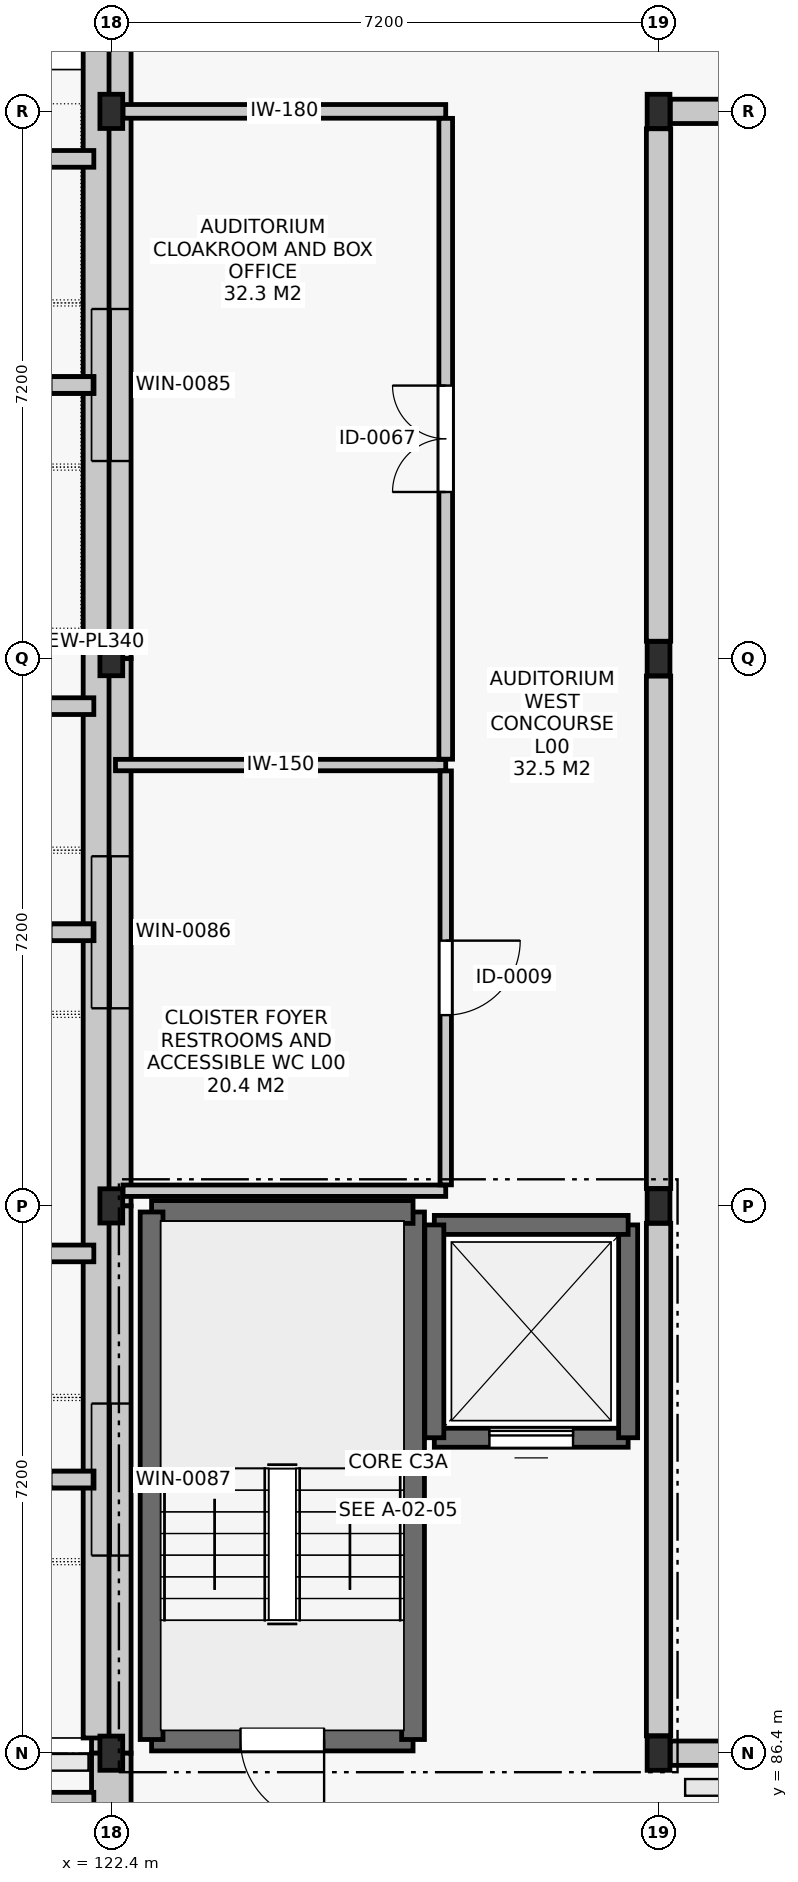
"""IFC4 building model, lengths in metres.
Left out: names, types, materials, properties, quantities, classifications, styles, units other than length and angle.
Written with IfcOpenShell. Run it as: python <this file> out.ifc"""

import sys

from ifc_helpers import new_model, si_unit, direction, frame, frame_2d, origin, origin_2d, place, context, subcontext, project, spatial, rectangle, i_section, extrude, element, fill, save


model = new_model("IFC4")
c1 = context("Model", 3, precision=1e-05, world=origin(), true_north=direction((0.0, 1.0)))
c2 = subcontext(c1, "Body", "Model", "MODEL_VIEW")
j1 = project(units=[si_unit("LENGTHUNIT", "METRE"), si_unit("PLANEANGLEUNIT", "RADIAN")], contexts=[c1])
p1 = place(None, origin())
s1 = spatial("IfcSite", under=j1, at=p1, CompositionType="ELEMENT")
p2 = place(p1, origin())
s2 = spatial("IfcBuilding", under=s1, at=p2, CompositionType="ELEMENT")
p3 = place(p2, origin())
s3 = spatial("IfcBuildingStorey", under=s2, at=p3, CompositionType="ELEMENT", Elevation=0.0)
for number, where, z_axis, x_axis in (
    (1, (122.4, 86.4, 0.0), (0.0, 0.0, 1.0), (1.0, 0.0, 0.0)),
    (2, (122.4, 93.6, 0.0), (0.0, 0.0, 1.0), (1.0, 0.0, 0.0)),
    (3, (122.4, 100.8, 0.0), (0.0, 0.0, 1.0), (1.0, 0.0, 0.0)),
    (4, (122.4, 108.0, 0.0), (0.0, 0.0, 1.0), (1.0, 0.0, 0.0)),
    (5, (129.6, 86.4, 0.0), (0.0, 0.0, 1.0), (1.0, 0.0, 0.0)),
    (6, (129.6, 93.6, 0.0), (0.0, 0.0, 1.0), (1.0, 0.0, 0.0)),
    (7, (129.6, 100.8, 0.0), (0.0, 0.0, 1.0), (1.0, 0.0, 0.0)),
    (8, (129.6, 108.0, 0.0), (0.0, 0.0, 1.0), (1.0, 0.0, 0.0)),
):
    element("IfcColumn", number, at=place(p3, frame(where, z_axis=z_axis, x_axis=x_axis)), inside=s3, PredefinedType="COLUMN", context=c2, shape_type="SweptSolid", body=[
        extrude(i_section(OverallWidth=0.3, OverallDepth=0.45, WebThickness=0.014, FlangeThickness=0.026, FilletRadius=0.027, at=origin_2d()), origin(), (0.0, 0.0, 1.0), 5.4),
    ])
p4 = place(p3, frame((122.4, 114.971, 0.0), z_axis=(0.0, 0.0, 1.0), x_axis=(0.0, -1.0, 0.0)))
e9 = element("IfcWall", 9, at=p4, inside=s3, PredefinedType="SOLIDWALL", context=c2, shape_type="SweptSolid", body=[
    extrude(rectangle(XDim=6.971, YDim=0.52, at=frame_2d((3.485, 0.0))), origin(), (0.0, 0.0, 1.0), 4.4),
])
p5 = place(p4, frame((2.371, 0.0, 1.35)))
e10 = element("IfcOpeningElement", 10, at=p5, cuts=e9, PredefinedType="OPENING", context=c2, shape_type="SweptSolid", body=[
    extrude(rectangle(XDim=2.0, YDim=1.5, at=frame_2d((1.0, 0.75))), frame((0.0, 0.272, 0.0), z_axis=(0.0, -1.0, 0.0), x_axis=(1.0, 0.0, 0.0)), (0.0, 0.0, 1.0), 0.544),
])
p6 = place(p3, frame((122.4, 108.0, 0.0), z_axis=(0.0, 0.0, 1.0), x_axis=(0.0, -1.0, 0.0)))
e11 = element("IfcWall", 11, at=p6, inside=s3, PredefinedType="SOLIDWALL", context=c2, shape_type="SweptSolid", body=[
    extrude(rectangle(XDim=7.2, YDim=0.52, at=frame_2d((3.6, 0.0))), origin(), (0.0, 0.0, 1.0), 4.4),
])
p7 = place(p6, frame((2.6, 0.0, 1.35)))
e12 = element("IfcOpeningElement", 12, at=p7, cuts=e11, PredefinedType="OPENING", context=c2, shape_type="SweptSolid", body=[
    extrude(rectangle(XDim=2.0, YDim=1.5, at=frame_2d((1.0, 0.75))), frame((0.0, 0.272, 0.0), z_axis=(0.0, -1.0, 0.0), x_axis=(1.0, 0.0, 0.0)), (0.0, 0.0, 1.0), 0.544),
])
p8 = place(p3, frame((122.4, 100.8, 0.0), z_axis=(0.0, 0.0, 1.0), x_axis=(0.0, -1.0, 0.0)))
e13 = element("IfcWall", 13, at=p8, inside=s3, PredefinedType="SOLIDWALL", context=c2, shape_type="SweptSolid", body=[
    extrude(rectangle(XDim=7.2, YDim=0.52, at=frame_2d((3.6, 0.0))), origin(), (0.0, 0.0, 1.0), 4.4),
])
p9 = place(p8, frame((2.6, 0.0, 1.35)))
e14 = element("IfcOpeningElement", 14, at=p9, cuts=e13, PredefinedType="OPENING", context=c2, shape_type="SweptSolid", body=[
    extrude(rectangle(XDim=2.0, YDim=1.5, at=frame_2d((1.0, 0.75))), frame((0.0, 0.272, 0.0), z_axis=(0.0, -1.0, 0.0), x_axis=(1.0, 0.0, 0.0)), (0.0, 0.0, 1.0), 0.544),
])
p10 = place(p3, frame((122.4, 93.6, 0.0), z_axis=(0.0, 0.0, 1.0), x_axis=(0.0, -1.0, 0.0)))
e15 = element("IfcWall", 15, at=p10, inside=s3, PredefinedType="SOLIDWALL", context=c2, shape_type="SweptSolid", body=[
    extrude(rectangle(XDim=7.2, YDim=0.52, at=frame_2d((3.6, 0.0))), origin(), (0.0, 0.0, 1.0), 4.4),
])
p11 = place(p10, frame((2.6, 0.0, 1.35)))
e16 = element("IfcOpeningElement", 16, at=p11, cuts=e15, PredefinedType="OPENING", context=c2, shape_type="SweptSolid", body=[
    extrude(rectangle(XDim=2.0, YDim=1.5, at=frame_2d((1.0, 0.75))), frame((0.0, 0.272, 0.0), z_axis=(0.0, -1.0, 0.0), x_axis=(1.0, 0.0, 0.0)), (0.0, 0.0, 1.0), 0.544),
])
p12 = place(p3, frame((122.4, 86.4, 0.0), z_axis=(0.0, 0.0, 1.0), x_axis=(0.0, -1.0, 0.0)))
e17 = element("IfcWall", 17, at=p12, inside=s3, PredefinedType="SOLIDWALL", context=c2, shape_type="SweptSolid", body=[
    extrude(rectangle(XDim=6.971, YDim=0.52, at=frame_2d((3.485, 0.0))), origin(), (0.0, 0.0, 1.0), 4.4),
])
p13 = place(p12, frame((2.7, 0.0, 0.0)))
e18 = element("IfcOpeningElement", 18, at=p13, cuts=e17, PredefinedType="OPENING", context=c2, shape_type="SweptSolid", body=[
    extrude(rectangle(XDim=1.8, YDim=2.3, at=frame_2d((0.9, 1.15))), frame((0.0, 0.272, 0.0), z_axis=(0.0, -1.0, 0.0), x_axis=(1.0, 0.0, 0.0)), (0.0, 0.0, 1.0), 0.544),
])
p14 = place(p3, frame((122.2, 86.6, -0.905), z_axis=(0.0, 0.0, 1.0), x_axis=(0.0, 1.0, 0.0)))
e19 = element("IfcWall", 19, at=p14, inside=s3, PredefinedType="SOLIDWALL", context=c2, shape_type="SweptSolid", body=[
    extrude(rectangle(XDim=28.85, YDim=0.34, at=frame_2d((14.425, 0.0))), origin(), (0.0, 0.0, 1.0), 0.905),
])
p15 = place(p3, frame((122.93, 86.58, 0.0), z_axis=(0.0, 0.0, 1.0), x_axis=(1.0, 0.0, 0.0)))
e20 = element("IfcWall", 20, at=p15, inside=s3, PredefinedType="SHEAR", context=c2, shape_type="SweptSolid", body=[
    extrude(rectangle(XDim=3.44, YDim=0.3, at=frame_2d((1.72, 0.0))), origin(), (0.0, 0.0, 1.0), 5.12),
])
p16 = place(p15, frame((1.17, 0.0, 0.0)))
e21 = element("IfcOpeningElement", 21, at=p16, cuts=e20, PredefinedType="OPENING", context=c2, shape_type="SweptSolid", body=[
    extrude(rectangle(XDim=1.1, YDim=2.15, at=frame_2d((0.55, 1.075))), frame((0.0, 0.162, 0.0), z_axis=(0.0, -1.0, 0.0), x_axis=(1.0, 0.0, 0.0)), (0.0, 0.0, 1.0), 0.324),
])
p17 = place(p3, frame((126.37, 86.58, 0.0), z_axis=(0.0, 0.0, 1.0), x_axis=(0.0, 1.0, 0.0)))
e22 = element("IfcWall", 22, at=p17, inside=s3, PredefinedType="SHEAR", context=c2, shape_type="SweptSolid", body=[
    extrude(rectangle(XDim=6.94, YDim=0.3, at=frame_2d((3.47, 0.0))), origin(), (0.0, 0.0, 1.0), 5.12),
])
p18 = place(p3, frame((126.37, 93.52, 0.0), z_axis=(0.0, 0.0, 1.0), x_axis=(-1.0, 0.0, 0.0)))
e23 = element("IfcWall", 23, at=p18, inside=s3, PredefinedType="SHEAR", context=c2, shape_type="SweptSolid", body=[
    extrude(rectangle(XDim=3.44, YDim=0.3, at=frame_2d((1.72, 0.0))), origin(), (0.0, 0.0, 1.0), 5.12),
])
p19 = place(p3, frame((122.93, 93.52, 0.0), z_axis=(0.0, 0.0, 1.0), x_axis=(0.0, -1.0, 0.0)))
e24 = element("IfcWall", 24, at=p19, inside=s3, PredefinedType="SHEAR", context=c2, shape_type="SweptSolid", body=[
    extrude(rectangle(XDim=6.94, YDim=0.3, at=frame_2d((3.47, 0.0))), origin(), (0.0, 0.0, 1.0), 5.12),
])
p20 = place(p3, frame((126.65, 90.55, 0.0), z_axis=(0.0, 0.0, 1.0), x_axis=(1.0, 0.0, 0.0)))
e25 = element("IfcWall", 25, at=p20, inside=s3, PredefinedType="SHEAR", context=c2, shape_type="SweptSolid", body=[
    extrude(rectangle(XDim=2.55, YDim=0.25, at=frame_2d((1.275, 0.0))), origin(), (0.0, 0.0, 1.0), 5.12),
])
p21 = place(p20, frame((0.725, 0.0, 0.0)))
e26 = element("IfcOpeningElement", 26, at=p21, cuts=e25, PredefinedType="OPENING", context=c2, shape_type="SweptSolid", body=[
    extrude(rectangle(XDim=1.1, YDim=2.1, at=frame_2d((0.55, 1.05))), frame((0.0, 0.137, 0.0), z_axis=(0.0, -1.0, 0.0), x_axis=(1.0, 0.0, 0.0)), (0.0, 0.0, 1.0), 0.274),
])
p22 = place(p3, frame((129.2, 90.55, 0.0), z_axis=(0.0, 0.0, 1.0), x_axis=(0.0, 1.0, 0.0)))
e27 = element("IfcWall", 27, at=p22, inside=s3, PredefinedType="SHEAR", context=c2, shape_type="SweptSolid", body=[
    extrude(rectangle(XDim=2.8, YDim=0.25, at=frame_2d((1.4, 0.0))), origin(), (0.0, 0.0, 1.0), 5.12),
])
p23 = place(p3, frame((129.2, 93.35, 0.0), z_axis=(0.0, 0.0, 1.0), x_axis=(-1.0, 0.0, 0.0)))
e28 = element("IfcWall", 28, at=p23, inside=s3, PredefinedType="SHEAR", context=c2, shape_type="SweptSolid", body=[
    extrude(rectangle(XDim=2.55, YDim=0.25, at=frame_2d((1.275, 0.0))), origin(), (0.0, 0.0, 1.0), 5.12),
])
p24 = place(p3, frame((126.65, 93.35, 0.0), z_axis=(0.0, 0.0, 1.0), x_axis=(0.0, -1.0, 0.0)))
e29 = element("IfcWall", 29, at=p24, inside=s3, PredefinedType="SHEAR", context=c2, shape_type="SweptSolid", body=[
    extrude(rectangle(XDim=2.8, YDim=0.25, at=frame_2d((1.4, 0.0))), origin(), (0.0, 0.0, 1.0), 5.12),
])
p25 = place(p3, frame((122.554, 93.8, 0.0), z_axis=(0.0, 0.0, 1.0), x_axis=(1.0, 0.0, 0.0)))
e30 = element("IfcWall", 30, at=p25, inside=s3, PredefinedType="PARTITIONING", context=c2, shape_type="SweptSolid", body=[
    extrude(rectangle(XDim=4.246, YDim=0.15, at=frame_2d((2.123, 0.0))), origin(), (0.0, 0.0, 1.0), 4.615),
])
p26 = place(p3, frame((122.455, 99.4, 0.0), z_axis=(0.0, 0.0, 1.0), x_axis=(1.0, 0.0, 0.0)))
e31 = element("IfcWall", 31, at=p26, inside=s3, PredefinedType="PARTITIONING", context=c2, shape_type="SweptSolid", body=[
    extrude(rectangle(XDim=4.345, YDim=0.15, at=frame_2d((2.172, 0.0))), origin(), (0.0, 0.0, 1.0), 4.555),
])
p27 = place(p3, frame((129.754, 86.4, 0.0), z_axis=(0.0, 0.0, 1.0), x_axis=(1.0, 0.0, 0.0)))
e32 = element("IfcWall", 32, at=p27, inside=s3, PredefinedType="SOLIDWALL", context=c2, shape_type="SweptSolid", body=[
    extrude(rectangle(XDim=6.892, YDim=0.32, at=frame_2d((3.446, 0.0))), origin(), (0.0, 0.0, 1.0), 5.105),
])
p28 = place(p27, frame((2.446, 0.0, 0.0)))
e33 = element("IfcOpeningElement", 33, at=p28, cuts=e32, PredefinedType="OPENING", context=c2, shape_type="SweptSolid", body=[
    extrude(rectangle(XDim=2.0, YDim=2.4, at=frame_2d((1.0, 1.2))), frame((0.0, 0.172, 0.0), z_axis=(0.0, -1.0, 0.0), x_axis=(1.0, 0.0, 0.0)), (0.0, 0.0, 1.0), 0.344),
])
p29 = place(p3, frame((129.754, 108.0, 0.0), z_axis=(0.0, 0.0, 1.0), x_axis=(1.0, 0.0, 0.0)))
e34 = element("IfcWall", 34, at=p29, inside=s3, PredefinedType="SOLIDWALL", context=c2, shape_type="SweptSolid", body=[
    extrude(rectangle(XDim=6.892, YDim=0.32, at=frame_2d((3.446, 0.0))), origin(), (0.0, 0.0, 1.0), 5.105),
])
p30 = place(p29, frame((2.446, 0.0, 0.0)))
e35 = element("IfcOpeningElement", 35, at=p30, cuts=e34, PredefinedType="OPENING", context=c2, shape_type="SweptSolid", body=[
    extrude(rectangle(XDim=2.0, YDim=2.4, at=frame_2d((1.0, 1.2))), frame((0.0, 0.172, 0.0), z_axis=(0.0, -1.0, 0.0), x_axis=(1.0, 0.0, 0.0)), (0.0, 0.0, 1.0), 0.344),
])
p31 = place(p3, frame((122.554, 108.0, 0.0), z_axis=(0.0, 0.0, 1.0), x_axis=(1.0, 0.0, 0.0)))
e36 = element("IfcWall", 36, at=p31, inside=s3, PredefinedType="PARTITIONING", context=c2, shape_type="SweptSolid", body=[
    extrude(rectangle(XDim=4.246, YDim=0.18, at=frame_2d((2.123, 0.0))), origin(), (0.0, 0.0, 1.0), 4.615),
])
p32 = place(p3, frame((126.8, 93.877, 0.0), z_axis=(0.0, 0.0, 1.0), x_axis=(0.0, 1.0, 0.0)))
e37 = element("IfcWall", 37, at=p32, inside=s3, PredefinedType="PARTITIONING", context=c2, shape_type="SweptSolid", body=[
    extrude(rectangle(XDim=5.446, YDim=0.15, at=frame_2d((2.723, 0.0))), origin(), (0.0, 0.0, 1.0), 5.105),
])
p33 = place(p32, frame((2.233, 0.0, 0.0)))
e38 = element("IfcOpeningElement", 38, at=p33, cuts=e37, PredefinedType="OPENING", context=c2, shape_type="SweptSolid", body=[
    extrude(rectangle(XDim=0.98, YDim=2.1, at=frame_2d((0.49, 1.05))), frame((0.0, 0.087, 0.0), z_axis=(0.0, -1.0, 0.0), x_axis=(1.0, 0.0, 0.0)), (0.0, 0.0, 1.0), 0.174),
])
p34 = place(p3, frame((129.6, 86.629, 0.0), z_axis=(0.0, 0.0, 1.0), x_axis=(0.0, 1.0, 0.0)))
e39 = element("IfcWall", 39, at=p34, inside=s3, PredefinedType="SOLIDWALL", context=c2, shape_type="SweptSolid", body=[
    extrude(rectangle(XDim=6.742, YDim=0.32, at=frame_2d((3.371, 0.0))), origin(), (0.0, 0.0, 1.0), 5.105),
])
for number, where, z_axis, x_axis in (
    (40, (129.6, 93.829, 0.0), (0.0, 0.0, 1.0), (0.0, 1.0, 0.0)),
    (41, (129.6, 101.029, 0.0), (0.0, 0.0, 1.0), (0.0, 1.0, 0.0)),
):
    element("IfcWall", number, at=place(p3, frame(where, z_axis=z_axis, x_axis=x_axis)), inside=s3, PredefinedType="SOLIDWALL", context=c2, shape_type="SweptSolid", body=[
        extrude(rectangle(XDim=6.742, YDim=0.32, at=frame_2d((3.371, 0.0))), origin(), (0.0, 0.0, 1.0), 5.105),
    ])
p35 = place(p3, frame((126.8, 99.477, 0.0), z_axis=(0.0, 0.0, 1.0), x_axis=(0.0, 1.0, 0.0)))
e42 = element("IfcWall", 42, at=p35, inside=s3, PredefinedType="PARTITIONING", context=c2, shape_type="SweptSolid", body=[
    extrude(rectangle(XDim=8.431, YDim=0.18, at=frame_2d((4.215, 0.0))), origin(), (0.0, 0.0, 1.0), 4.615),
])
p36 = place(p35, frame((3.515, 0.0, 0.0)))
e43 = element("IfcOpeningElement", 43, at=p36, cuts=e42, PredefinedType="OPENING", context=c2, shape_type="SweptSolid", body=[
    extrude(rectangle(XDim=1.4, YDim=2.2, at=frame_2d((0.7, 1.1))), frame((0.0, 0.102, 0.0), z_axis=(0.0, -1.0, 0.0), x_axis=(1.0, 0.0, 0.0)), (0.0, 0.0, 1.0), 0.204),
])
p37 = place(p7, origin())
e44 = element("IfcWindow", 44, at=p37, inside=s3, PartitioningType="SINGLE_PANEL", PredefinedType="WINDOW", context=c2, shape_type="SweptSolid", body=[
    extrude(rectangle(XDim=2.0, YDim=1.5, at=frame_2d((1.0, 0.75))), frame((0.0, 0.03, 0.0), z_axis=(0.0, -1.0, 0.0), x_axis=(1.0, 0.0, 0.0)), (0.0, 0.0, 1.0), 0.06),
])
fill(e12, e44)
p38 = place(p9, origin())
e45 = element("IfcWindow", 45, at=p38, inside=s3, PartitioningType="SINGLE_PANEL", PredefinedType="WINDOW", context=c2, shape_type="SweptSolid", body=[
    extrude(rectangle(XDim=2.0, YDim=1.5, at=frame_2d((1.0, 0.75))), frame((0.0, 0.03, 0.0), z_axis=(0.0, -1.0, 0.0), x_axis=(1.0, 0.0, 0.0)), (0.0, 0.0, 1.0), 0.06),
])
fill(e14, e45)
p39 = place(p11, origin())
e46 = element("IfcWindow", 46, at=p39, inside=s3, PartitioningType="SINGLE_PANEL", PredefinedType="WINDOW", context=c2, shape_type="SweptSolid", body=[
    extrude(rectangle(XDim=2.0, YDim=1.5, at=frame_2d((1.0, 0.75))), frame((0.0, 0.03, 0.0), z_axis=(0.0, -1.0, 0.0), x_axis=(1.0, 0.0, 0.0)), (0.0, 0.0, 1.0), 0.06),
])
fill(e16, e46)
p40 = place(p16, frame((1.1, 0.0, 0.0), z_axis=(0.0, 0.0, 1.0), x_axis=(-1.0, 0.0, 0.0)))
e47 = element("IfcDoor", 47, at=p40, inside=s3, OperationType="SINGLE_SWING_LEFT", PredefinedType="DOOR", context=c2, shape_type="SweptSolid", body=[
    extrude(rectangle(XDim=1.1, YDim=2.15, at=frame_2d((0.55, 1.075))), frame((0.0, 0.025, 0.0), z_axis=(0.0, -1.0, 0.0), x_axis=(1.0, 0.0, 0.0)), (0.0, 0.0, 1.0), 0.05),
])
fill(e21, e47)
p41 = place(p21, origin())
e48 = element("IfcDoor", 48, at=p41, inside=s3, OperationType="SLIDING_TO_LEFT", PredefinedType="DOOR", context=c2, shape_type="SweptSolid", body=[
    extrude(rectangle(XDim=1.1, YDim=2.1, at=frame_2d((0.55, 1.05))), frame((0.0, 0.025, 0.0), z_axis=(0.0, -1.0, 0.0), x_axis=(1.0, 0.0, 0.0)), (0.0, 0.0, 1.0), 0.05),
])
fill(e26, e48)
p42 = place(p33, frame((0.98, 0.0, 0.0), z_axis=(0.0, 0.0, 1.0), x_axis=(-1.0, 0.0, 0.0)))
e49 = element("IfcDoor", 49, at=p42, inside=s3, OperationType="SINGLE_SWING_LEFT", PredefinedType="DOOR", context=c2, shape_type="SweptSolid", body=[
    extrude(rectangle(XDim=0.98, YDim=2.1, at=frame_2d((0.49, 1.05))), frame((0.0, 0.025, 0.0), z_axis=(0.0, -1.0, 0.0), x_axis=(1.0, 0.0, 0.0)), (0.0, 0.0, 1.0), 0.05),
])
fill(e38, e49)
p43 = place(p36, origin())
e50 = element("IfcDoor", 50, at=p43, inside=s3, OperationType="DOUBLE_DOOR_SINGLE_SWING", PredefinedType="DOOR", context=c2, shape_type="SweptSolid", body=[
    extrude(rectangle(XDim=1.4, YDim=2.2, at=frame_2d((0.7, 1.1))), frame((0.0, 0.025, 0.0), z_axis=(0.0, -1.0, 0.0), x_axis=(1.0, 0.0, 0.0)), (0.0, 0.0, 1.0), 0.05),
])
fill(e43, e50)
save(model, sys.argv[1])
